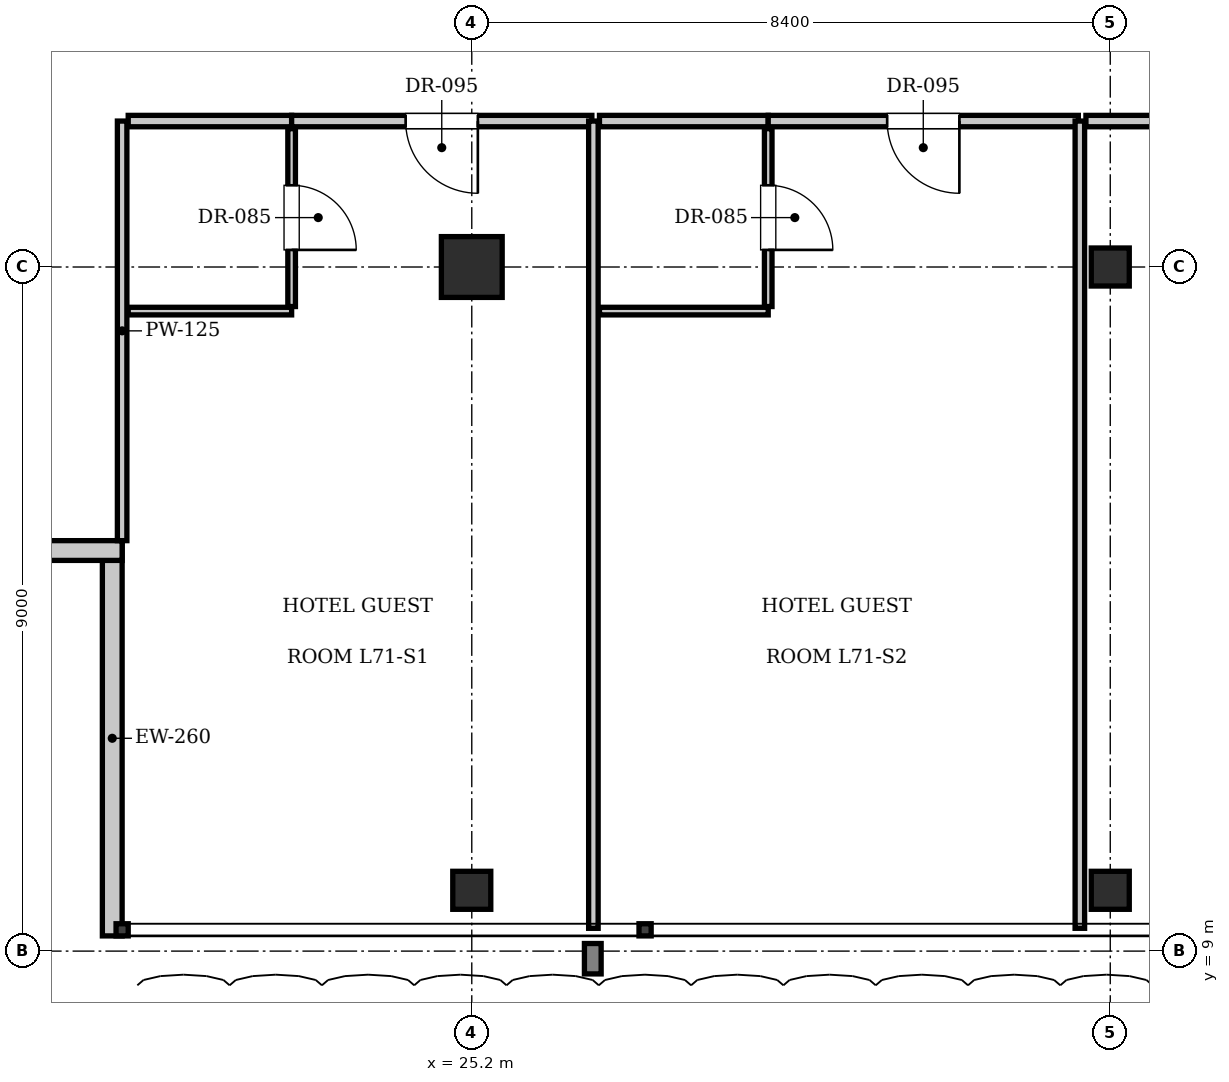
"""IFC4 building model, lengths in metres.
Left out: names, types, materials, properties, quantities, classifications, styles, units other than length and angle.
Written with IfcOpenShell. Run it as: python <this file> out.ifc"""

import sys

from ifc_helpers import new_model, si_unit, direction, frame, frame_2d, origin, origin_2d, place, context, subcontext, project, spatial, rectangle, i_section, extrude, element, fill, save


model = new_model("IFC4")
c1 = context("Model", 3, precision=1e-05, world=origin(), true_north=direction((0.0, 1.0)))
c2 = subcontext(c1, "Body", "Model", "MODEL_VIEW")
j1 = project(units=[si_unit("LENGTHUNIT", "METRE"), si_unit("PLANEANGLEUNIT", "RADIAN")], contexts=[c1])
p1 = place(None, origin())
s1 = spatial("IfcSite", under=j1, at=p1, CompositionType="ELEMENT")
p2 = place(p1, origin())
s2 = spatial("IfcBuilding", under=s1, at=p2, CompositionType="ELEMENT")
p3 = place(p2, frame((0.0, 0.0, 289.45)))
s3 = spatial("IfcBuildingStorey", under=s2, at=p3, CompositionType="ELEMENT", Elevation=289.45)
p4 = place(p3, frame((25.2, 18.0, 0.0), z_axis=(0.0, 0.0, 1.0), x_axis=(1.0, 0.0, 0.0)))
e1 = element("IfcColumn", 1, at=p4, inside=s3, PredefinedType="COLUMN", context=c2, shape_type="SweptSolid", body=[
    extrude(rectangle(XDim=0.8, YDim=0.8, at=origin_2d()), origin(), (0.0, 0.0, 1.0), 3.85),
])
for number, where, z_axis, x_axis in (
    (2, (33.6, 18.0, 0.0), (0.0, 0.0, 1.0), (1.0, 0.0, 0.0)),
    (3, (25.2, 9.8, 0.0), (0.0, 0.0, 1.0), (1.0, 0.0, 0.0)),
    (4, (33.6, 9.8, 0.0), (0.0, 0.0, 1.0), (1.0, 0.0, 0.0)),
):
    element("IfcColumn", number, at=place(p3, frame(where, z_axis=z_axis, x_axis=x_axis)), inside=s3, PredefinedType="COLUMN", context=c2, shape_type="SweptSolid", body=[
        extrude(i_section(OverallWidth=0.5, OverallDepth=0.5, WebThickness=0.022, FlangeThickness=0.032, at=origin_2d()), origin(), (0.0, 0.0, 1.0), 3.85),
    ])
p5 = place(p3, frame((20.47, 9.2, 0.0), z_axis=(0.0, 0.0, 1.0), x_axis=(0.0, 1.0, 0.0)))
e5 = element("IfcWall", 5, at=p5, inside=s3, PredefinedType="SOLIDWALL", context=c2, shape_type="SweptSolid", body=[
    extrude(rectangle(XDim=5.2, YDim=0.26, at=frame_2d((2.6, 0.0))), origin(), (0.0, 0.0, 1.0), 3.61),
])
p6 = place(p3, frame((20.6, 14.27, 0.0), z_axis=(0.0, 0.0, 1.0), x_axis=(-1.0, 0.0, 0.0)))
e6 = element("IfcWall", 6, at=p6, inside=s3, PredefinedType="SOLIDWALL", context=c2, shape_type="SweptSolid", body=[
    extrude(rectangle(XDim=5.2, YDim=0.26, at=frame_2d((2.6, 0.0))), origin(), (0.0, 0.0, 1.0), 3.61),
])
p7 = place(p6, frame((1.6, 0.0, 0.9)))
e7 = element("IfcOpeningElement", 7, at=p7, cuts=e6, PredefinedType="OPENING", context=c2, shape_type="SweptSolid", body=[
    extrude(rectangle(XDim=2.0, YDim=2.2, at=frame_2d((1.0, 1.1))), frame((0.0, 0.14, 0.0), z_axis=(0.0, -1.0, 0.0), x_axis=(1.0, 0.0, 0.0)), (0.0, 0.0, 1.0), 0.28),
])
p8 = place(p3, frame((20.6, 14.4, 0.0), z_axis=(0.0, 0.0, 1.0), x_axis=(0.0, 1.0, 0.0)))
e8 = element("IfcWall", 8, at=p8, inside=s3, PredefinedType="PARTITIONING", context=c2, shape_type="SweptSolid", body=[
    extrude(rectangle(XDim=5.52, YDim=0.125, at=frame_2d((2.76, 0.0))), origin(), (0.0, 0.0, 1.0), 3.61),
])
p9 = place(p3, frame((20.68, 19.92, 0.0), z_axis=(0.0, 0.0, 1.0), x_axis=(1.0, 0.0, 0.0)))
e9 = element("IfcWall", 9, at=p9, inside=s3, PredefinedType="PARTITIONING", context=c2, shape_type="SweptSolid", body=[
    extrude(rectangle(XDim=2.15, YDim=0.15, at=frame_2d((1.075, 0.0))), origin(), (0.0, 0.0, 1.0), 3.61),
])
p10 = place(p3, frame((20.68, 17.42, 0.0), z_axis=(0.0, 0.0, 1.0), x_axis=(1.0, 0.0, 0.0)))
e10 = element("IfcWall", 10, at=p10, inside=s3, PredefinedType="PARTITIONING", context=c2, shape_type="SweptSolid", body=[
    extrude(rectangle(XDim=2.15, YDim=0.1, at=frame_2d((1.075, 0.0))), origin(), (0.0, 0.0, 1.0), 3.61),
])
p11 = place(p3, frame((22.83, 17.48, 0.0), z_axis=(0.0, 0.0, 1.0), x_axis=(0.0, 1.0, 0.0)))
e11 = element("IfcWall", 11, at=p11, inside=s3, PredefinedType="PARTITIONING", context=c2, shape_type="SweptSolid", body=[
    extrude(rectangle(XDim=2.34, YDim=0.1, at=frame_2d((1.17, 0.0))), origin(), (0.0, 0.0, 1.0), 3.61),
])
p12 = place(p11, frame((0.745, 0.0, 0.0)))
e12 = element("IfcOpeningElement", 12, at=p12, cuts=e11, PredefinedType="OPENING", context=c2, shape_type="SweptSolid", body=[
    extrude(rectangle(XDim=0.85, YDim=2.1, at=frame_2d((0.425, 1.05))), frame((0.0, 0.06, 0.0), z_axis=(0.0, -1.0, 0.0), x_axis=(1.0, 0.0, 0.0)), (0.0, 0.0, 1.0), 0.12),
])
p13 = place(p3, frame((22.83, 19.92, 0.0), z_axis=(0.0, 0.0, 1.0), x_axis=(1.0, 0.0, 0.0)))
e13 = element("IfcWall", 13, at=p13, inside=s3, PredefinedType="PARTITIONING", context=c2, shape_type="SweptSolid", body=[
    extrude(rectangle(XDim=3.95, YDim=0.15, at=frame_2d((1.975, 0.0))), origin(), (0.0, 0.0, 1.0), 3.61),
])
p14 = place(p13, frame((1.5, 0.0, 0.0)))
e14 = element("IfcOpeningElement", 14, at=p14, cuts=e13, PredefinedType="OPENING", context=c2, shape_type="SweptSolid", body=[
    extrude(rectangle(XDim=0.95, YDim=2.15, at=frame_2d((0.475, 1.075))), frame((0.0, 0.085, 0.0), z_axis=(0.0, -1.0, 0.0), x_axis=(1.0, 0.0, 0.0)), (0.0, 0.0, 1.0), 0.17),
])
p15 = place(p3, frame((26.8, 9.3, 0.0), z_axis=(0.0, 0.0, 1.0), x_axis=(0.0, 1.0, 0.0)))
e15 = element("IfcWall", 15, at=p15, inside=s3, PredefinedType="PARTITIONING", context=c2, shape_type="SweptSolid", body=[
    extrude(rectangle(XDim=10.62, YDim=0.125, at=frame_2d((5.31, 0.0))), origin(), (0.0, 0.0, 1.0), 3.61),
])
p16 = place(p3, frame((26.88, 19.92, 0.0), z_axis=(0.0, 0.0, 1.0), x_axis=(1.0, 0.0, 0.0)))
e16 = element("IfcWall", 16, at=p16, inside=s3, PredefinedType="PARTITIONING", context=c2, shape_type="SweptSolid", body=[
    extrude(rectangle(XDim=2.22, YDim=0.15, at=frame_2d((1.11, 0.0))), origin(), (0.0, 0.0, 1.0), 3.61),
])
p17 = place(p3, frame((26.88, 17.42, 0.0), z_axis=(0.0, 0.0, 1.0), x_axis=(1.0, 0.0, 0.0)))
e17 = element("IfcWall", 17, at=p17, inside=s3, PredefinedType="PARTITIONING", context=c2, shape_type="SweptSolid", body=[
    extrude(rectangle(XDim=2.22, YDim=0.1, at=frame_2d((1.11, 0.0))), origin(), (0.0, 0.0, 1.0), 3.61),
])
p18 = place(p3, frame((29.1, 17.48, 0.0), z_axis=(0.0, 0.0, 1.0), x_axis=(0.0, 1.0, 0.0)))
e18 = element("IfcWall", 18, at=p18, inside=s3, PredefinedType="PARTITIONING", context=c2, shape_type="SweptSolid", body=[
    extrude(rectangle(XDim=2.34, YDim=0.1, at=frame_2d((1.17, 0.0))), origin(), (0.0, 0.0, 1.0), 3.61),
])
p19 = place(p18, frame((0.745, 0.0, 0.0)))
e19 = element("IfcOpeningElement", 19, at=p19, cuts=e18, PredefinedType="OPENING", context=c2, shape_type="SweptSolid", body=[
    extrude(rectangle(XDim=0.85, YDim=2.1, at=frame_2d((0.425, 1.05))), frame((0.0, 0.06, 0.0), z_axis=(0.0, -1.0, 0.0), x_axis=(1.0, 0.0, 0.0)), (0.0, 0.0, 1.0), 0.12),
])
p20 = place(p3, frame((29.1, 19.92, 0.0), z_axis=(0.0, 0.0, 1.0), x_axis=(1.0, 0.0, 0.0)))
e20 = element("IfcWall", 20, at=p20, inside=s3, PredefinedType="PARTITIONING", context=c2, shape_type="SweptSolid", body=[
    extrude(rectangle(XDim=4.08, YDim=0.15, at=frame_2d((2.04, 0.0))), origin(), (0.0, 0.0, 1.0), 3.61),
])
p21 = place(p20, frame((1.565, 0.0, 0.0)))
e21 = element("IfcOpeningElement", 21, at=p21, cuts=e20, PredefinedType="OPENING", context=c2, shape_type="SweptSolid", body=[
    extrude(rectangle(XDim=0.95, YDim=2.15, at=frame_2d((0.475, 1.075))), frame((0.0, 0.085, 0.0), z_axis=(0.0, -1.0, 0.0), x_axis=(1.0, 0.0, 0.0)), (0.0, 0.0, 1.0), 0.17),
])
p22 = place(p3, frame((33.2, 9.3, 0.0), z_axis=(0.0, 0.0, 1.0), x_axis=(0.0, 1.0, 0.0)))
e22 = element("IfcWall", 22, at=p22, inside=s3, PredefinedType="PARTITIONING", context=c2, shape_type="SweptSolid", body=[
    extrude(rectangle(XDim=10.62, YDim=0.125, at=frame_2d((5.31, 0.0))), origin(), (0.0, 0.0, 1.0), 3.61),
])
p23 = place(p3, frame((33.28, 19.92, 0.0), z_axis=(0.0, 0.0, 1.0), x_axis=(1.0, 0.0, 0.0)))
e23 = element("IfcWall", 23, at=p23, inside=s3, PredefinedType="PARTITIONING", context=c2, shape_type="SweptSolid", body=[
    extrude(rectangle(XDim=4.17, YDim=0.15, at=frame_2d((2.085, 0.0))), origin(), (0.0, 0.0, 1.0), 3.61),
])
p24 = place(p23, frame((1.61, 0.0, 0.0)))
e24 = element("IfcOpeningElement", 24, at=p24, cuts=e23, PredefinedType="OPENING", context=c2, shape_type="SweptSolid", body=[
    extrude(rectangle(XDim=0.95, YDim=2.15, at=frame_2d((0.475, 1.075))), frame((0.0, 0.085, 0.0), z_axis=(0.0, -1.0, 0.0), x_axis=(1.0, 0.0, 0.0)), (0.0, 0.0, 1.0), 0.17),
])
p25 = place(p12, frame((0.85, 0.0, 0.0), z_axis=(0.0, 0.0, 1.0), x_axis=(-1.0, 0.0, 0.0)))
e25 = element("IfcDoor", 25, at=p25, inside=s3, OperationType="SINGLE_SWING_RIGHT", PredefinedType="DOOR", context=c2, shape_type="SweptSolid", body=[
    extrude(rectangle(XDim=0.85, YDim=2.1, at=frame_2d((0.425, 1.05))), frame((0.0, 0.025, 0.0), z_axis=(0.0, -1.0, 0.0), x_axis=(1.0, 0.0, 0.0)), (0.0, 0.0, 1.0), 0.05),
])
fill(e12, e25)
p26 = place(p14, frame((0.95, 0.0, 0.0), z_axis=(0.0, 0.0, 1.0), x_axis=(-1.0, 0.0, 0.0)))
e26 = element("IfcDoor", 26, at=p26, inside=s3, OperationType="SINGLE_SWING_LEFT", PredefinedType="DOOR", context=c2, shape_type="SweptSolid", body=[
    extrude(rectangle(XDim=0.95, YDim=2.15, at=frame_2d((0.475, 1.075))), frame((0.0, 0.025, 0.0), z_axis=(0.0, -1.0, 0.0), x_axis=(1.0, 0.0, 0.0)), (0.0, 0.0, 1.0), 0.05),
])
fill(e14, e26)
p27 = place(p19, frame((0.85, 0.0, 0.0), z_axis=(0.0, 0.0, 1.0), x_axis=(-1.0, 0.0, 0.0)))
e27 = element("IfcDoor", 27, at=p27, inside=s3, OperationType="SINGLE_SWING_RIGHT", PredefinedType="DOOR", context=c2, shape_type="SweptSolid", body=[
    extrude(rectangle(XDim=0.85, YDim=2.1, at=frame_2d((0.425, 1.05))), frame((0.0, 0.025, 0.0), z_axis=(0.0, -1.0, 0.0), x_axis=(1.0, 0.0, 0.0)), (0.0, 0.0, 1.0), 0.05),
])
fill(e19, e27)
p28 = place(p21, frame((0.95, 0.0, 0.0), z_axis=(0.0, 0.0, 1.0), x_axis=(-1.0, 0.0, 0.0)))
e28 = element("IfcDoor", 28, at=p28, inside=s3, OperationType="SINGLE_SWING_LEFT", PredefinedType="DOOR", context=c2, shape_type="SweptSolid", body=[
    extrude(rectangle(XDim=0.95, YDim=2.15, at=frame_2d((0.475, 1.075))), frame((0.0, 0.025, 0.0), z_axis=(0.0, -1.0, 0.0), x_axis=(1.0, 0.0, 0.0)), (0.0, 0.0, 1.0), 0.05),
])
fill(e21, e28)
save(model, sys.argv[1])
